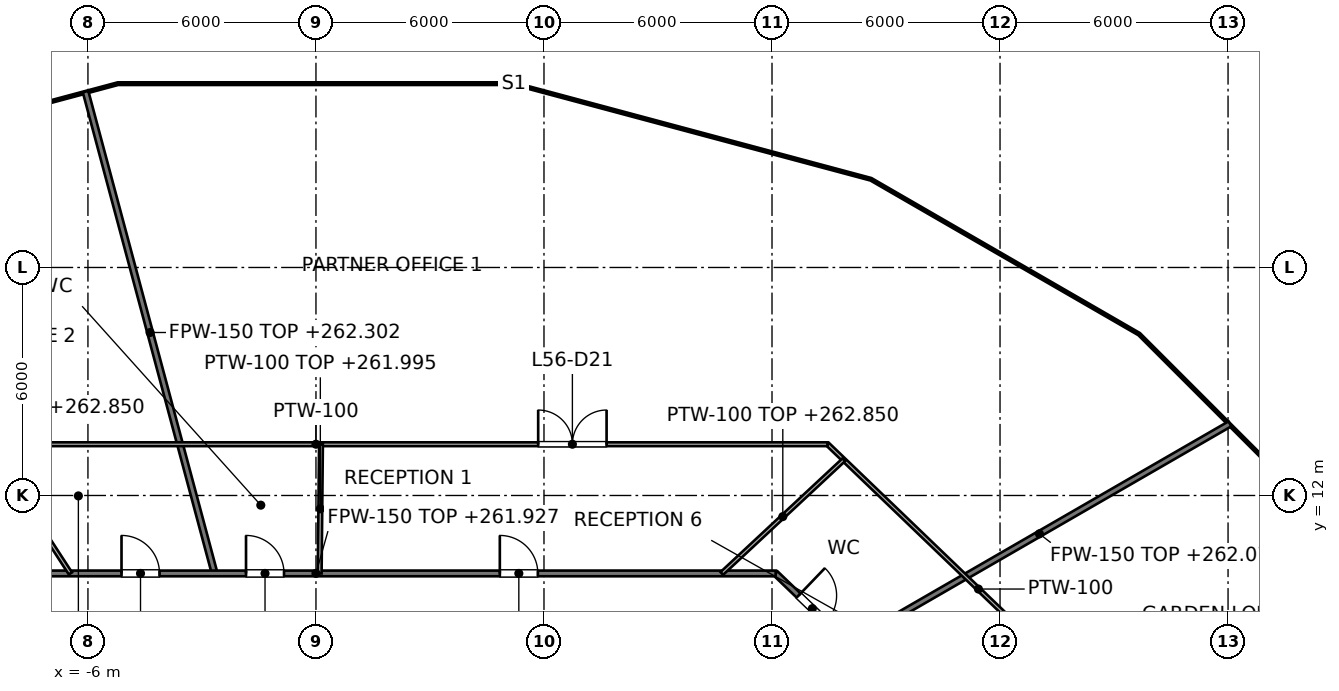
"""IFC4 building model, lengths in metres.
Left out: names, types, materials, properties, quantities, classifications, styles, units other than length and angle.
Written with IfcOpenShell. Run it as: python <this file> out.ifc"""

import sys

from ifc_helpers import new_model, si_unit, direction, frame, frame_2d, origin, place, context, subcontext, project, spatial, rectangle, extrude, element, fill, save


model = new_model("IFC4")
c1 = context("Model", 3, precision=1e-05, world=origin(), true_north=direction((0.0, 1.0)))
c2 = subcontext(c1, "Body", "Model", "MODEL_VIEW")
j1 = project(units=[si_unit("LENGTHUNIT", "METRE"), si_unit("PLANEANGLEUNIT", "RADIAN")], contexts=[c1])
p1 = place(None, origin())
s1 = spatial("IfcSite", under=j1, at=p1, CompositionType="ELEMENT")
p2 = place(p1, origin())
s2 = spatial("IfcBuilding", under=s1, at=p2, CompositionType="ELEMENT")
p3 = place(p2, frame((0.0, 0.0, 259.0)))
s3 = spatial("IfcBuildingStorey", under=s2, at=p3, CompositionType="ELEMENT", Elevation=259.0)
p4 = place(p3, frame((-6.063, 22.629, 0.0), z_axis=(0.0, 0.0, 1.0), x_axis=(0.258776059344, -0.965937343263, 0.0)))
e1 = element("IfcWall", 1, at=p4, inside=s3, PredefinedType="PARTITIONING", context=c2, shape_type="SweptSolid", body=[
    extrude(rectangle(XDim=13.127, YDim=0.15, at=frame_2d((6.563, 0.0))), origin(), (0.0, 0.0, 1.0), 3.302),
])
p5 = place(p3, frame((12.095, 9.949, 0.0), z_axis=(0.0, 0.0, 1.0), x_axis=(0.721290181137, -0.692633001376, 0.0)))
e2 = element("IfcWall", 2, at=p5, inside=s3, PredefinedType="PARTITIONING", context=c2, shape_type="SweptSolid", body=[
    extrude(rectangle(XDim=8.187, YDim=0.15, at=frame_2d((4.094, 0.0))), origin(), (0.0, 0.0, 1.0), 2.918),
])
p6 = place(p5, frame((0.839, 0.0, 0.0)))
e3 = element("IfcOpeningElement", 3, at=p6, cuts=e2, PredefinedType="OPENING", context=c2, shape_type="SweptSolid", body=[
    extrude(rectangle(XDim=1.0, YDim=2.1, at=frame_2d((0.5, 1.05))), frame((0.0, 0.075, 0.0), z_axis=(0.0, -1.0, 0.0), x_axis=(1.0, 0.0, 0.0)), (0.0, 0.0, 1.0), 0.15),
])
p7 = place(p5, frame((3.542, 0.0, 0.0)))
e4 = element("IfcOpeningElement", 4, at=p7, cuts=e2, PredefinedType="OPENING", context=c2, shape_type="SweptSolid", body=[
    extrude(rectangle(XDim=1.0, YDim=2.1, at=frame_2d((0.5, 1.05))), frame((0.0, 0.075, 0.0), z_axis=(0.0, -1.0, 0.0), x_axis=(1.0, 0.0, 0.0)), (0.0, 0.0, 1.0), 0.15),
])
p8 = place(p3, frame((-12.095, 9.949, 0.0), z_axis=(0.0, 0.0, 1.0), x_axis=(1.0, 0.0, 0.0)))
e5 = element("IfcWall", 5, at=p8, inside=s3, PredefinedType="PARTITIONING", context=c2, shape_type="SweptSolid", body=[
    extrude(rectangle(XDim=24.19, YDim=0.15, at=frame_2d((12.095, 0.0))), origin(), (0.0, 0.0, 1.0), 2.927),
])
p9 = place(p8, frame((16.933, 0.0, 0.0)))
e6 = element("IfcOpeningElement", 6, at=p9, cuts=e5, PredefinedType="OPENING", context=c2, shape_type="SweptSolid", body=[
    extrude(rectangle(XDim=1.0, YDim=2.1, at=frame_2d((0.5, 1.05))), frame((0.0, 0.075, 0.0), z_axis=(0.0, -1.0, 0.0), x_axis=(1.0, 0.0, 0.0)), (0.0, 0.0, 1.0), 0.15),
])
p10 = place(p8, frame((10.255, 0.0, 0.0)))
e7 = element("IfcOpeningElement", 7, at=p10, cuts=e5, PredefinedType="OPENING", context=c2, shape_type="SweptSolid", body=[
    extrude(rectangle(XDim=1.0, YDim=2.1, at=frame_2d((0.5, 1.05))), frame((0.0, 0.075, 0.0), z_axis=(0.0, -1.0, 0.0), x_axis=(1.0, 0.0, 0.0)), (0.0, 0.0, 1.0), 0.15),
])
p11 = place(p8, frame((6.978, 0.0, 0.0)))
e8 = element("IfcOpeningElement", 8, at=p11, cuts=e5, PredefinedType="OPENING", context=c2, shape_type="SweptSolid", body=[
    extrude(rectangle(XDim=1.0, YDim=2.1, at=frame_2d((0.5, 1.05))), frame((0.0, 0.075, 0.0), z_axis=(0.0, -1.0, 0.0), x_axis=(1.0, 0.0, 0.0)), (0.0, 0.0, 1.0), 0.15),
])
p12 = place(p8, frame((2.317, 0.0, 0.0)))
e9 = element("IfcOpeningElement", 9, at=p12, cuts=e5, PredefinedType="OPENING", context=c2, shape_type="SweptSolid", body=[
    extrude(rectangle(XDim=1.0, YDim=2.1, at=frame_2d((0.5, 1.05))), frame((0.0, 0.075, 0.0), z_axis=(0.0, -1.0, 0.0), x_axis=(1.0, 0.0, 0.0)), (0.0, 0.0, 1.0), 0.15),
])
p13 = place(p3, frame((14.024, 8.097, 0.0), z_axis=(0.0, 0.0, 1.0), x_axis=(0.866020528885, 0.500008443478, 0.0)))
e10 = element("IfcWall", 10, at=p13, inside=s3, PredefinedType="PARTITIONING", context=c2, shape_type="SweptSolid", body=[
    extrude(rectangle(XDim=11.577, YDim=0.15, at=frame_2d((5.789, 0.0))), origin(), (0.0, 0.0, 1.0), 3.076),
])
p14 = place(p3, frame((-8.669, 13.349, 0.0), z_axis=(0.0, 0.0, 1.0), x_axis=(0.544626347019, -0.83867880749, 0.0)))
e11 = element("IfcWall", 11, at=p14, inside=s3, PredefinedType="PARTITIONING", context=c2, shape_type="SweptSolid", body=[
    extrude(rectangle(XDim=4.054, YDim=0.1, at=frame_2d((2.027, 0.0))), origin(), (0.0, 0.0, 1.0), 3.85),
])
p15 = place(p3, frame((13.463, 13.349, 0.0), z_axis=(0.0, 0.0, 1.0), x_axis=(0.721293766873, -0.692629267264, 0.0)))
e12 = element("IfcWall", 12, at=p15, inside=s3, PredefinedType="PARTITIONING", context=c2, shape_type="SweptSolid", body=[
    extrude(rectangle(XDim=11.004, YDim=0.1, at=frame_2d((5.502, 0.0))), origin(), (0.0, 0.0, 1.0), 2.927),
])
p16 = place(p15, frame((7.565, 0.0, 0.0)))
e13 = element("IfcOpeningElement", 13, at=p16, cuts=e12, PredefinedType="OPENING", context=c2, shape_type="SweptSolid", body=[
    extrude(rectangle(XDim=0.9, YDim=2.1, at=frame_2d((0.45, 1.05))), frame((0.0, 0.05, 0.0), z_axis=(0.0, -1.0, 0.0), x_axis=(1.0, 0.0, 0.0)), (0.0, 0.0, 1.0), 0.1),
])
p17 = place(p3, frame((-13.463, 13.349, 0.0), z_axis=(0.0, 0.0, 1.0), x_axis=(1.0, 0.0, 0.0)))
e14 = element("IfcWall", 14, at=p17, inside=s3, PredefinedType="PARTITIONING", context=c2, shape_type="SweptSolid", body=[
    extrude(rectangle(XDim=26.926, YDim=0.1, at=frame_2d((13.463, 0.0))), origin(), (0.0, 0.0, 1.0), 2.927),
])
p18 = place(p17, frame((19.31, 0.0, 0.0)))
e15 = element("IfcOpeningElement", 15, at=p18, cuts=e14, PredefinedType="OPENING", context=c2, shape_type="SweptSolid", body=[
    extrude(rectangle(XDim=1.8, YDim=2.1, at=frame_2d((0.9, 1.05))), frame((0.0, 0.05, 0.0), z_axis=(0.0, -1.0, 0.0), x_axis=(1.0, 0.0, 0.0)), (0.0, 0.0, 1.0), 0.1),
])
p19 = place(p3, frame((10.679, 9.949, 0.0), z_axis=(0.0, 0.0, 1.0), x_axis=(0.731623098171, 0.681709353187, 0.0)))
e16 = element("IfcWall", 16, at=p19, inside=s3, PredefinedType="PARTITIONING", context=c2, shape_type="SweptSolid", body=[
    extrude(rectangle(XDim=4.387, YDim=0.1, at=frame_2d((2.194, 0.0))), origin(), (0.0, 0.0, 1.0), 3.85),
])
p20 = place(p3, frame((0.098, 9.949, 0.0), z_axis=(0.0, 0.0, 1.0), x_axis=(0.010051908305, 0.999949478293, 0.0)))
e17 = element("IfcWall", 17, at=p20, inside=s3, PredefinedType="PARTITIONING", context=c2, shape_type="SweptSolid", body=[
    extrude(rectangle(XDim=3.4, YDim=0.1, at=frame_2d((1.7, 0.0))), origin(), (0.0, 0.0, 1.0), 2.995),
])
p21 = place(p6, origin())
e18 = element("IfcDoor", 18, at=p21, inside=s3, OperationType="SINGLE_SWING_LEFT", PredefinedType="DOOR", context=c2, shape_type="SweptSolid", body=[
    extrude(rectangle(XDim=1.0, YDim=2.1, at=frame_2d((0.5, 1.05))), frame((0.0, 0.025, 0.0), z_axis=(0.0, -1.0, 0.0), x_axis=(1.0, 0.0, 0.0)), (0.0, 0.0, 1.0), 0.05),
])
fill(e3, e18)
p22 = place(p9, origin())
e19 = element("IfcDoor", 19, at=p22, inside=s3, OperationType="SINGLE_SWING_LEFT", PredefinedType="DOOR", context=c2, shape_type="SweptSolid", body=[
    extrude(rectangle(XDim=1.0, YDim=2.1, at=frame_2d((0.5, 1.05))), frame((0.0, 0.025, 0.0), z_axis=(0.0, -1.0, 0.0), x_axis=(1.0, 0.0, 0.0)), (0.0, 0.0, 1.0), 0.05),
])
fill(e6, e19)
p23 = place(p10, origin())
e20 = element("IfcDoor", 20, at=p23, inside=s3, OperationType="SINGLE_SWING_LEFT", PredefinedType="DOOR", context=c2, shape_type="SweptSolid", body=[
    extrude(rectangle(XDim=1.0, YDim=2.1, at=frame_2d((0.5, 1.05))), frame((0.0, 0.025, 0.0), z_axis=(0.0, -1.0, 0.0), x_axis=(1.0, 0.0, 0.0)), (0.0, 0.0, 1.0), 0.05),
])
fill(e7, e20)
p24 = place(p18, origin())
e21 = element("IfcDoor", 21, at=p24, inside=s3, OperationType="DOUBLE_DOOR_SINGLE_SWING", PredefinedType="DOOR", context=c2, shape_type="SweptSolid", body=[
    extrude(rectangle(XDim=1.8, YDim=2.1, at=frame_2d((0.9, 1.05))), frame((0.0, 0.025, 0.0), z_axis=(0.0, -1.0, 0.0), x_axis=(1.0, 0.0, 0.0)), (0.0, 0.0, 1.0), 0.05),
])
fill(e15, e21)
p25 = place(p11, origin())
e22 = element("IfcDoor", 22, at=p25, inside=s3, OperationType="SINGLE_SWING_LEFT", PredefinedType="DOOR", context=c2, shape_type="SweptSolid", body=[
    extrude(rectangle(XDim=1.0, YDim=2.1, at=frame_2d((0.5, 1.05))), frame((0.0, 0.025, 0.0), z_axis=(0.0, -1.0, 0.0), x_axis=(1.0, 0.0, 0.0)), (0.0, 0.0, 1.0), 0.05),
])
fill(e8, e22)
save(model, sys.argv[1])
